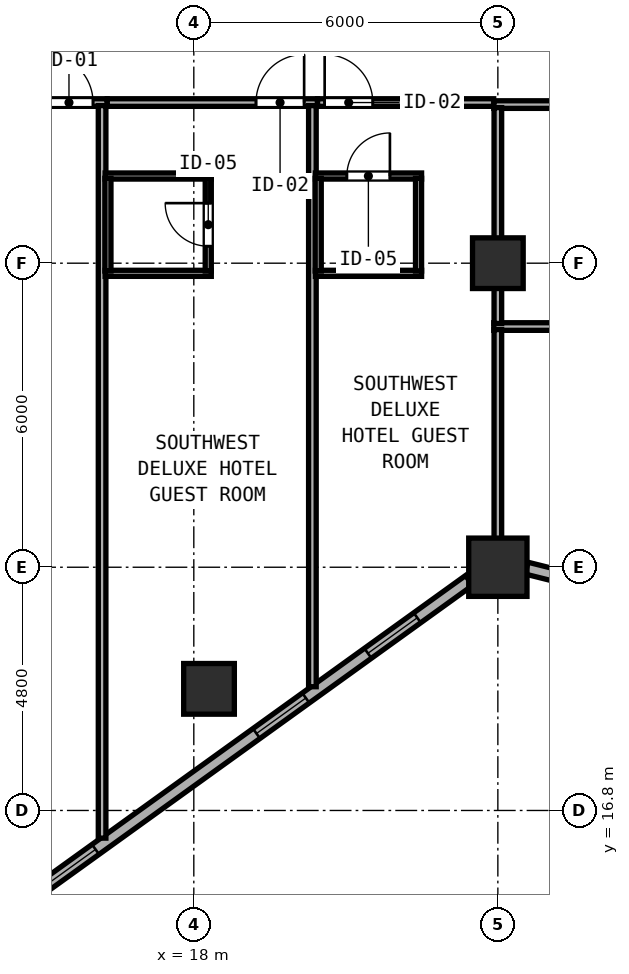
"""IFC4 building model, lengths in metres.
Left out: names, types, materials, properties, quantities, classifications, styles, units other than length and angle.
Written with IfcOpenShell. Run it as: python <this file> out.ifc"""

import sys

from ifc_helpers import new_model, si_unit, direction, frame, frame_2d, origin, origin_2d, place, context, subcontext, project, spatial, rectangle, hollow_rectangle, extrude, element, fill, save


model = new_model("IFC4")
c1 = context("Model", 3, precision=1e-05, world=origin(), true_north=direction((0.0, 1.0)))
c2 = subcontext(c1, "Body", "Model", "MODEL_VIEW")
j1 = project(units=[si_unit("LENGTHUNIT", "METRE"), si_unit("PLANEANGLEUNIT", "RADIAN")], contexts=[c1])
p1 = place(None, origin())
s1 = spatial("IfcSite", under=j1, at=p1, CompositionType="ELEMENT")
p2 = place(p1, origin())
s2 = spatial("IfcBuilding", under=s1, at=p2, CompositionType="ELEMENT")
p3 = place(p2, frame((0.0, 0.0, 78.0)))
s3 = spatial("IfcBuildingStorey", under=s2, at=p3, CompositionType="ELEMENT", Elevation=78.0)
p4 = place(p3, frame((24.0, 21.6, 0.0), z_axis=(0.0, 0.0, 1.0), x_axis=(1.0, 0.0, 0.0)))
e1 = element("IfcColumn", 1, at=p4, inside=s3, PredefinedType="COLUMN", context=c2, shape_type="SweptSolid", body=[
    extrude(hollow_rectangle(XDim=1.15, YDim=1.15, WallThickness=0.042, at=origin_2d()), origin(), (0.0, 0.0, 1.0), 3.8),
])
for number, where, z_axis, x_axis in (
    (2, (24.0, 27.6, 0.0), (0.0, 0.0, 1.0), (1.0, 0.0, 0.0)),
    (3, (18.3, 19.2, 0.0), (0.0, 0.0, 1.0), (1.0, 0.0, 0.0)),
):
    element("IfcColumn", number, at=place(p3, frame(where, z_axis=z_axis, x_axis=x_axis)), inside=s3, PredefinedType="COLUMN", context=c2, shape_type="SweptSolid", body=[
        extrude(hollow_rectangle(XDim=1.0, YDim=1.0, WallThickness=0.038, at=origin_2d()), origin(), (0.0, 0.0, 1.0), 3.8),
    ])
p5 = place(p3, frame((14.075, 14.602, 0.0), z_axis=(0.0, 0.0, 1.0), x_axis=(0.811543176492, 0.58429245476, 0.0)))
e4 = element("IfcWall", 4, at=p5, inside=s3, PredefinedType="SOLIDWALL", context=c2, shape_type="SweptSolid", body=[
    extrude(rectangle(XDim=11.531, YDim=0.24, at=frame_2d((5.765, 0.0))), origin(), (0.0, 0.0, 1.0), 3.097),
])
p6 = place(p5, frame((1.246, 0.0, 0.85)))
e5 = element("IfcOpeningElement", 5, at=p6, cuts=e4, PredefinedType="OPENING", context=c2, shape_type="SweptSolid", body=[
    extrude(rectangle(XDim=1.2, YDim=1.85, at=frame_2d((0.6, 0.925))), frame((0.0, 0.13, 0.0), z_axis=(0.0, -1.0, 0.0), x_axis=(1.0, 0.0, 0.0)), (0.0, 0.0, 1.0), 0.26),
])
p7 = place(p5, frame((6.36, 0.0, 0.85)))
e6 = element("IfcOpeningElement", 6, at=p7, cuts=e4, PredefinedType="OPENING", context=c2, shape_type="SweptSolid", body=[
    extrude(rectangle(XDim=1.2, YDim=1.85, at=frame_2d((0.6, 0.925))), frame((0.0, 0.13, 0.0), z_axis=(0.0, -1.0, 0.0), x_axis=(1.0, 0.0, 0.0)), (0.0, 0.0, 1.0), 0.26),
])
p8 = place(p5, frame((9.07, 0.0, 0.85)))
e7 = element("IfcOpeningElement", 7, at=p8, cuts=e4, PredefinedType="OPENING", context=c2, shape_type="SweptSolid", body=[
    extrude(rectangle(XDim=1.2, YDim=1.85, at=frame_2d((0.6, 0.925))), frame((0.0, 0.13, 0.0), z_axis=(0.0, -1.0, 0.0), x_axis=(1.0, 0.0, 0.0)), (0.0, 0.0, 1.0), 0.26),
])
p9 = place(p3, frame((24.567, 21.582, 0.0), z_axis=(0.0, 0.0, 1.0), x_axis=(0.970148978127, -0.24250971164, 0.0)))
e8 = element("IfcWall", 8, at=p9, inside=s3, PredefinedType="SOLIDWALL", context=c2, shape_type="SweptSolid", body=[
    extrude(rectangle(XDim=4.434, YDim=0.24, at=frame_2d((2.217, 0.0))), origin(), (0.0, 0.0, 1.0), 3.097),
])
p10 = place(p9, frame((1.6, 0.0, 0.85)))
e9 = element("IfcOpeningElement", 9, at=p10, cuts=e8, PredefinedType="OPENING", context=c2, shape_type="SweptSolid", body=[
    extrude(rectangle(XDim=1.2, YDim=1.85, at=frame_2d((0.6, 0.925))), frame((0.0, 0.13, 0.0), z_axis=(0.0, -1.0, 0.0), x_axis=(1.0, 0.0, 0.0)), (0.0, 0.0, 1.0), 0.26),
])
for number, where, z_axis, x_axis in (
    (10, (23.92, 30.73, 0.0), (0.0, 0.0, 1.0), (1.0, 0.0, 0.0)),
    (11, (23.92, 26.35, 0.0), (0.0, 0.0, 1.0), (1.0, 0.0, 0.0)),
):
    element("IfcWall", number, at=place(p3, frame(where, z_axis=z_axis, x_axis=x_axis)), inside=s3, PredefinedType="PARTITIONING", context=c2, shape_type="SweptSolid", body=[
        extrude(rectangle(XDim=3.8, YDim=0.15, at=frame_2d((1.9, 0.0))), origin(), (0.0, 0.0, 1.0), 3.6),
    ])
p11 = place(p3, frame((24.0, 26.41, 0.0), z_axis=(0.0, 0.0, 1.0), x_axis=(0.0, 1.0, 0.0)))
e12 = element("IfcWall", 12, at=p11, inside=s3, PredefinedType="PARTITIONING", context=c2, shape_type="SweptSolid", body=[
    extrude(rectangle(XDim=4.26, YDim=0.15, at=frame_2d((2.13, 0.0))), origin(), (0.0, 0.0, 1.0), 3.097),
])
p12 = place(p3, frame((11.7, 30.77, 0.0), z_axis=(0.0, 0.0, 1.0), x_axis=(1.0, 0.0, 0.0)))
e13 = element("IfcWall", 13, at=p12, inside=s3, PredefinedType="PARTITIONING", context=c2, shape_type="SweptSolid", body=[
    extrude(rectangle(XDim=4.59, YDim=0.15, at=frame_2d((2.295, 0.0))), origin(), (0.0, 0.0, 1.0), 3.6),
])
p13 = place(p12, frame((4.311, 0.0, 0.0), z_axis=(0.0, 0.0, 1.0), x_axis=(-1.0, 0.0, 0.0)))
e14 = element("IfcOpeningElement", 14, at=p13, cuts=e13, PredefinedType="OPENING", context=c2, shape_type="SweptSolid", body=[
    extrude(rectangle(XDim=0.95, YDim=2.18, at=frame_2d((0.475, 1.09))), frame((0.0, 0.085, 0.0), z_axis=(0.0, -1.0, 0.0), x_axis=(1.0, 0.0, 0.0)), (0.0, 0.0, 1.0), 0.17),
])
p14 = place(p3, frame((16.19, 16.254, 0.0), z_axis=(0.0, 0.0, 1.0), x_axis=(0.0, 1.0, 0.0)))
e15 = element("IfcWall", 15, at=p14, inside=s3, PredefinedType="PARTITIONING", context=c2, shape_type="SweptSolid", body=[
    extrude(rectangle(XDim=14.456, YDim=0.15, at=frame_2d((7.228, 0.0))), origin(), (0.0, 0.0, 1.0), 3.6),
])
p15 = place(p3, frame((16.292, 30.77, 0.0), z_axis=(0.0, 0.0, 1.0), x_axis=(1.0, 0.0, 0.0)))
e16 = element("IfcWall", 16, at=p15, inside=s3, PredefinedType="PARTITIONING", context=c2, shape_type="SweptSolid", body=[
    extrude(rectangle(XDim=4.148, YDim=0.15, at=frame_2d((2.074, 0.0))), origin(), (0.0, 0.0, 1.0), 3.6),
])
p16 = place(p15, frame((3.885, 0.0, 0.0), z_axis=(0.0, 0.0, 1.0), x_axis=(-1.0, 0.0, 0.0)))
e17 = element("IfcOpeningElement", 17, at=p16, cuts=e16, PredefinedType="OPENING", context=c2, shape_type="SweptSolid", body=[
    extrude(rectangle(XDim=0.95, YDim=2.15, at=frame_2d((0.475, 1.075))), frame((0.0, 0.085, 0.0), z_axis=(0.0, -1.0, 0.0), x_axis=(1.0, 0.0, 0.0)), (0.0, 0.0, 1.0), 0.17),
])
p17 = place(p3, frame((20.34, 19.242, 0.0), z_axis=(0.0, 0.0, 1.0), x_axis=(0.0, 1.0, 0.0)))
e18 = element("IfcWall", 18, at=p17, inside=s3, PredefinedType="PARTITIONING", context=c2, shape_type="SweptSolid", body=[
    extrude(rectangle(XDim=11.468, YDim=0.15, at=frame_2d((5.734, 0.0))), origin(), (0.0, 0.0, 1.0), 3.6),
])
p18 = place(p3, frame((16.25, 29.32, 0.0), z_axis=(0.0, 0.0, 1.0), x_axis=(1.0, 0.0, 0.0)))
e19 = element("IfcWall", 19, at=p18, inside=s3, PredefinedType="PARTITIONING", context=c2, shape_type="SweptSolid", body=[
    extrude(rectangle(XDim=2.095, YDim=0.12, at=frame_2d((1.047, 0.0))), origin(), (0.0, 0.0, 1.0), 3.6),
])
p19 = place(p3, frame((16.25, 27.4, 0.0), z_axis=(0.0, 0.0, 1.0), x_axis=(1.0, 0.0, 0.0)))
e20 = element("IfcWall", 20, at=p19, inside=s3, PredefinedType="PARTITIONING", context=c2, shape_type="SweptSolid", body=[
    extrude(rectangle(XDim=2.095, YDim=0.12, at=frame_2d((1.047, 0.0))), origin(), (0.0, 0.0, 1.0), 3.097),
])
p20 = place(p3, frame((16.305, 27.445, 0.0), z_axis=(0.0, 0.0, 1.0), x_axis=(0.0, 1.0, 0.0)))
e21 = element("IfcWall", 21, at=p20, inside=s3, PredefinedType="PARTITIONING", context=c2, shape_type="SweptSolid", body=[
    extrude(rectangle(XDim=1.83, YDim=0.12, at=frame_2d((0.915, 0.0))), origin(), (0.0, 0.0, 1.0), 3.6),
])
p21 = place(p3, frame((18.285, 27.445, 0.0), z_axis=(0.0, 0.0, 1.0), x_axis=(0.0, 1.0, 0.0)))
e22 = element("IfcWall", 22, at=p21, inside=s3, PredefinedType="PARTITIONING", context=c2, shape_type="SweptSolid", body=[
    extrude(rectangle(XDim=1.83, YDim=0.12, at=frame_2d((0.915, 0.0))), origin(), (0.0, 0.0, 1.0), 3.6),
])
p22 = place(p21, frame((0.49, 0.0, 0.0)))
e23 = element("IfcOpeningElement", 23, at=p22, cuts=e22, PredefinedType="OPENING", context=c2, shape_type="SweptSolid", body=[
    extrude(rectangle(XDim=0.85, YDim=2.1, at=frame_2d((0.425, 1.05))), frame((0.0, 0.07, 0.0), z_axis=(0.0, -1.0, 0.0), x_axis=(1.0, 0.0, 0.0)), (0.0, 0.0, 1.0), 0.14),
])
p23 = place(p3, frame((20.442, 30.77, 0.0), z_axis=(0.0, 0.0, 1.0), x_axis=(1.0, 0.0, 0.0)))
e24 = element("IfcWall", 24, at=p23, inside=s3, PredefinedType="PARTITIONING", context=c2, shape_type="SweptSolid", body=[
    extrude(rectangle(XDim=3.476, YDim=0.15, at=frame_2d((1.738, 0.0))), origin(), (0.0, 0.0, 1.0), 3.6),
])
p24 = place(p23, frame((1.09, 0.0, 0.0), z_axis=(0.0, 0.0, 1.0), x_axis=(-1.0, 0.0, 0.0)))
e25 = element("IfcOpeningElement", 25, at=p24, cuts=e24, PredefinedType="OPENING", context=c2, shape_type="SweptSolid", body=[
    extrude(rectangle(XDim=0.95, YDim=2.15, at=frame_2d((0.475, 1.075))), frame((0.0, 0.085, 0.0), z_axis=(0.0, -1.0, 0.0), x_axis=(1.0, 0.0, 0.0)), (0.0, 0.0, 1.0), 0.17),
])
p25 = place(p3, frame((24.0, 21.819, 0.0), z_axis=(0.0, 0.0, 1.0), x_axis=(0.0, 1.0, 0.0)))
e26 = element("IfcWall", 26, at=p25, inside=s3, PredefinedType="PARTITIONING", context=c2, shape_type="SweptSolid", body=[
    extrude(rectangle(XDim=4.471, YDim=0.15, at=frame_2d((2.236, 0.0))), origin(), (0.0, 0.0, 1.0), 3.097),
])
p26 = place(p3, frame((20.4, 29.32, 0.0), z_axis=(0.0, 0.0, 1.0), x_axis=(1.0, 0.0, 0.0)))
e27 = element("IfcWall", 27, at=p26, inside=s3, PredefinedType="PARTITIONING", context=c2, shape_type="SweptSolid", body=[
    extrude(rectangle(XDim=2.095, YDim=0.12, at=frame_2d((1.048, 0.0))), origin(), (0.0, 0.0, 1.0), 3.6),
])
p27 = place(p26, frame((1.47, 0.0, 0.0), z_axis=(0.0, 0.0, 1.0), x_axis=(-1.0, 0.0, 0.0)))
e28 = element("IfcOpeningElement", 28, at=p27, cuts=e27, PredefinedType="OPENING", context=c2, shape_type="SweptSolid", body=[
    extrude(rectangle(XDim=0.85, YDim=2.1, at=frame_2d((0.425, 1.05))), frame((0.0, 0.07, 0.0), z_axis=(0.0, -1.0, 0.0), x_axis=(1.0, 0.0, 0.0)), (0.0, 0.0, 1.0), 0.14),
])
p28 = place(p3, frame((20.4, 27.4, 0.0), z_axis=(0.0, 0.0, 1.0), x_axis=(1.0, 0.0, 0.0)))
e29 = element("IfcWall", 29, at=p28, inside=s3, PredefinedType="PARTITIONING", context=c2, shape_type="SweptSolid", body=[
    extrude(rectangle(XDim=2.095, YDim=0.12, at=frame_2d((1.048, 0.0))), origin(), (0.0, 0.0, 1.0), 3.097),
])
for number, where, z_axis, x_axis in (
    (30, (20.455, 27.445, 0.0), (0.0, 0.0, 1.0), (0.0, 1.0, 0.0)),
    (31, (22.435, 27.445, 0.0), (0.0, 0.0, 1.0), (0.0, 1.0, 0.0)),
):
    element("IfcWall", number, at=place(p3, frame(where, z_axis=z_axis, x_axis=x_axis)), inside=s3, PredefinedType="PARTITIONING", context=c2, shape_type="SweptSolid", body=[
        extrude(rectangle(XDim=1.83, YDim=0.12, at=frame_2d((0.915, 0.0))), origin(), (0.0, 0.0, 1.0), 3.6),
    ])
p29 = place(p6, origin())
e32 = element("IfcWindow", 32, at=p29, inside=s3, PartitioningType="SINGLE_PANEL", PredefinedType="WINDOW", context=c2, shape_type="SweptSolid", body=[
    extrude(rectangle(XDim=1.2, YDim=1.85, at=frame_2d((0.6, 0.925))), frame((0.0, 0.03, 0.0), z_axis=(0.0, -1.0, 0.0), x_axis=(1.0, 0.0, 0.0)), (0.0, 0.0, 1.0), 0.06),
])
fill(e5, e32)
p30 = place(p7, origin())
e33 = element("IfcWindow", 33, at=p30, inside=s3, PartitioningType="SINGLE_PANEL", PredefinedType="WINDOW", context=c2, shape_type="SweptSolid", body=[
    extrude(rectangle(XDim=1.2, YDim=1.85, at=frame_2d((0.6, 0.925))), frame((0.0, 0.03, 0.0), z_axis=(0.0, -1.0, 0.0), x_axis=(1.0, 0.0, 0.0)), (0.0, 0.0, 1.0), 0.06),
])
fill(e6, e33)
p31 = place(p13, origin())
e34 = element("IfcDoor", 34, at=p31, inside=s3, OperationType="SINGLE_SWING_RIGHT", PredefinedType="DOOR", context=c2, shape_type="SweptSolid", body=[
    extrude(rectangle(XDim=0.95, YDim=2.18, at=frame_2d((0.475, 1.09))), frame((0.0, 0.025, 0.0), z_axis=(0.0, -1.0, 0.0), x_axis=(1.0, 0.0, 0.0)), (0.0, 0.0, 1.0), 0.05),
])
fill(e14, e34)
p32 = place(p16, origin())
e35 = element("IfcDoor", 35, at=p32, inside=s3, OperationType="SINGLE_SWING_LEFT", PredefinedType="DOOR", context=c2, shape_type="SweptSolid", body=[
    extrude(rectangle(XDim=0.95, YDim=2.15, at=frame_2d((0.475, 1.075))), frame((0.0, 0.025, 0.0), z_axis=(0.0, -1.0, 0.0), x_axis=(1.0, 0.0, 0.0)), (0.0, 0.0, 1.0), 0.05),
])
fill(e17, e35)
p33 = place(p22, origin())
e36 = element("IfcDoor", 36, at=p33, inside=s3, OperationType="SINGLE_SWING_RIGHT", PredefinedType="DOOR", context=c2, shape_type="SweptSolid", body=[
    extrude(rectangle(XDim=0.85, YDim=2.1, at=frame_2d((0.425, 1.05))), frame((0.0, 0.025, 0.0), z_axis=(0.0, -1.0, 0.0), x_axis=(1.0, 0.0, 0.0)), (0.0, 0.0, 1.0), 0.05),
])
fill(e23, e36)
p34 = place(p24, origin())
e37 = element("IfcDoor", 37, at=p34, inside=s3, OperationType="SINGLE_SWING_RIGHT", PredefinedType="DOOR", context=c2, shape_type="SweptSolid", body=[
    extrude(rectangle(XDim=0.95, YDim=2.15, at=frame_2d((0.475, 1.075))), frame((0.0, 0.025, 0.0), z_axis=(0.0, -1.0, 0.0), x_axis=(1.0, 0.0, 0.0)), (0.0, 0.0, 1.0), 0.05),
])
fill(e25, e37)
p35 = place(p27, origin())
e38 = element("IfcDoor", 38, at=p35, inside=s3, OperationType="SINGLE_SWING_LEFT", PredefinedType="DOOR", context=c2, shape_type="SweptSolid", body=[
    extrude(rectangle(XDim=0.85, YDim=2.1, at=frame_2d((0.425, 1.05))), frame((0.0, 0.025, 0.0), z_axis=(0.0, -1.0, 0.0), x_axis=(1.0, 0.0, 0.0)), (0.0, 0.0, 1.0), 0.05),
])
fill(e28, e38)
p36 = place(p8, origin())
e39 = element("IfcWindow", 39, at=p36, inside=s3, PartitioningType="SINGLE_PANEL", PredefinedType="WINDOW", context=c2, shape_type="SweptSolid", body=[
    extrude(rectangle(XDim=1.2, YDim=1.85, at=frame_2d((0.6, 0.925))), frame((0.0, 0.03, 0.0), z_axis=(0.0, -1.0, 0.0), x_axis=(1.0, 0.0, 0.0)), (0.0, 0.0, 1.0), 0.06),
])
fill(e7, e39)
save(model, sys.argv[1])
